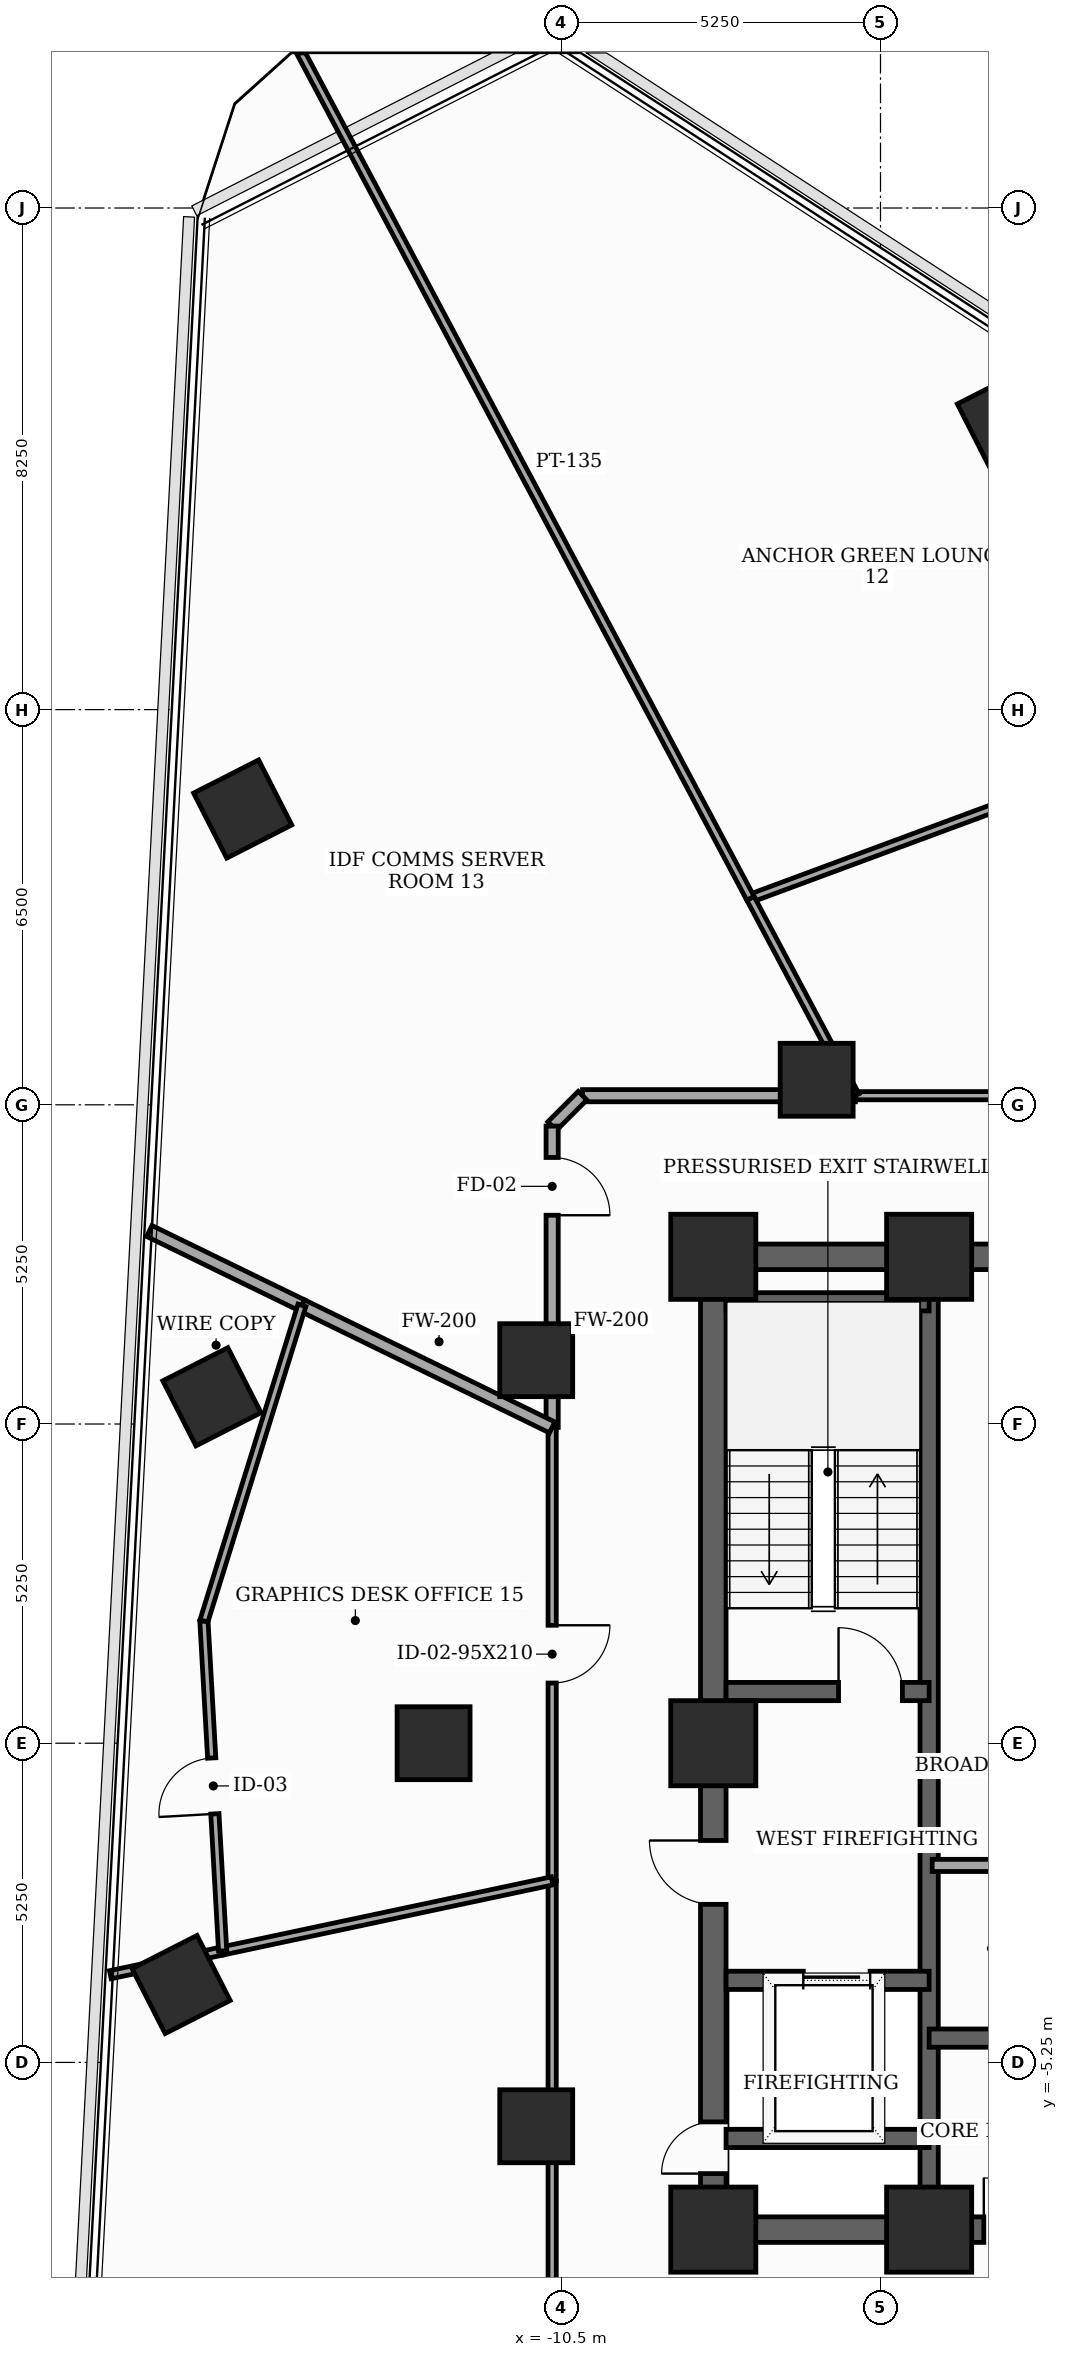
"""IFC4 building model, lengths in metres.
Left out: names, types, materials, properties, quantities, classifications, styles, units other than length and angle.
Written with IfcOpenShell. Run it as: python <this file> out.ifc"""

import sys

from ifc_helpers import new_model, si_unit, direction, frame, frame_2d, origin, origin_2d, place, context, subcontext, project, spatial, rectangle, extrude, element, fill, save


model = new_model("IFC4")
c1 = context("Model", 3, precision=1e-05, world=origin(), true_north=direction((0.0, 1.0)))
c2 = subcontext(c1, "Body", "Model", "MODEL_VIEW")
j1 = project(units=[si_unit("LENGTHUNIT", "METRE"), si_unit("PLANEANGLEUNIT", "RADIAN")], contexts=[c1])
p1 = place(None, origin())
s1 = spatial("IfcSite", under=j1, at=p1, CompositionType="ELEMENT")
p2 = place(p1, origin())
s2 = spatial("IfcBuilding", under=s1, at=p2, CompositionType="ELEMENT")
p3 = place(p2, frame((0.0, 0.0, 145.8)))
s3 = spatial("IfcBuildingStorey", under=s2, at=p3, CompositionType="ELEMENT", Elevation=145.8)
for number, where, z_axis, x_axis in (
    (1, (-8.0, -8.0, 0.0), (0.0, 0.0, 1.0), (1.0, 0.0, 0.0)),
    (2, (-4.45, -8.0, 0.0), (0.0, 0.0, 1.0), (1.0, 0.0, 0.0)),
    (3, (-4.45, 8.0, 0.0), (0.0, 0.0, 1.0), (1.0, 0.0, 0.0)),
    (4, (-8.0, 8.0, 0.0), (0.0, 0.0, 1.0), (1.0, 0.0, 0.0)),
    (5, (-8.0, 0.0, 0.0), (0.0, 0.0, 1.0), (1.0, 0.0, 0.0)),
):
    element("IfcColumn", number, at=place(p3, frame(where, z_axis=z_axis, x_axis=x_axis)), inside=s3, PredefinedType="COLUMN", context=c2, shape_type="SweptSolid", body=[
        extrude(rectangle(XDim=1.4, YDim=1.4, at=origin_2d()), origin(), (0.0, 0.0, 1.0), 3.7),
    ])
for number, where, z_axis, x_axis in (
    (6, (-6.3, 10.912, 0.0), (0.0, 0.0, 1.0), (1.0, 0.0, 0.0)),
    (7, (-10.912, 6.3, 0.0), (0.0, 0.0, 1.0), (1.0, 0.0, 0.0)),
    (8, (-12.6, 0.0, 0.0), (0.0, 0.0, 1.0), (1.0, 0.0, 0.0)),
    (9, (-10.912, -6.3, 0.0), (0.0, 0.0, 1.0), (1.0, 0.0, 0.0)),
    (10, (-3.179, 21.765, 0.0), (0.0, 0.0, 1.0), (0.891, 0.454, 0.0)),
    (11, (-15.739, 15.365, 0.0), (0.0, 0.0, 1.0), (0.891, 0.454, 0.0)),
    (12, (-16.246, 5.698, 0.0), (0.0, 0.0, 1.0), (0.891, 0.454, 0.0)),
    (13, (-16.752, -3.969, 0.0), (0.0, 0.0, 1.0), (0.891, 0.454, 0.0)),
):
    element("IfcColumn", number, at=place(p3, frame(where, z_axis=z_axis, x_axis=x_axis)), inside=s3, PredefinedType="COLUMN", context=c2, shape_type="SweptSolid", body=[
        extrude(rectangle(XDim=1.2, YDim=1.2, at=origin_2d()), origin(), (0.0, 0.0, 1.0), 3.7),
    ])
p4 = place(p3, frame((-8.0, -8.0, 0.0), z_axis=(0.0, 0.0, 1.0), x_axis=(0.0, 1.0, 0.0)))
e14 = element("IfcWall", 14, at=p4, inside=s3, PredefinedType="SHEAR", context=c2, shape_type="SweptSolid", body=[
    extrude(rectangle(XDim=16.0, YDim=0.42, at=frame_2d((8.0, 0.0))), origin(), (0.0, 0.0, 1.0), 3.46),
])
p5 = place(p4, frame((0.922, 0.0, 0.0)))
e15 = element("IfcOpeningElement", 15, at=p5, cuts=e14, PredefinedType="OPENING", context=c2, shape_type="SweptSolid", body=[
    extrude(rectangle(XDim=0.85, YDim=2.02, at=frame_2d((0.425, 1.01))), frame((0.0, 0.22, 0.0), z_axis=(0.0, -1.0, 0.0), x_axis=(1.0, 0.0, 0.0)), (0.0, 0.0, 1.0), 0.44),
])
p6 = place(p4, frame((5.35, 0.0, 0.0)))
e16 = element("IfcOpeningElement", 16, at=p6, cuts=e14, PredefinedType="OPENING", context=c2, shape_type="SweptSolid", body=[
    extrude(rectangle(XDim=1.05, YDim=2.15, at=frame_2d((0.525, 1.075))), frame((0.0, 0.22, 0.0), z_axis=(0.0, -1.0, 0.0), x_axis=(1.0, 0.0, 0.0)), (0.0, 0.0, 1.0), 0.44),
])
p7 = place(p3, frame((-8.0, -8.0, 0.0), z_axis=(0.0, 0.0, 1.0), x_axis=(1.0, 0.0, 0.0)))
e17 = element("IfcWall", 17, at=p7, inside=s3, PredefinedType="SHEAR", context=c2, shape_type="SweptSolid", body=[
    extrude(rectangle(XDim=16.0, YDim=0.42, at=frame_2d((8.0, 0.0))), origin(), (0.0, 0.0, 1.0), 3.46),
])
p8 = place(p7, frame((4.449, 0.0, 0.0)))
e18 = element("IfcOpeningElement", 18, at=p8, cuts=e17, PredefinedType="OPENING", context=c2, shape_type="SweptSolid", body=[
    extrude(rectangle(XDim=0.85, YDim=2.02, at=frame_2d((0.425, 1.01))), frame((0.0, 0.22, 0.0), z_axis=(0.0, -1.0, 0.0), x_axis=(1.0, 0.0, 0.0)), (0.0, 0.0, 1.0), 0.44),
])
p9 = place(p7, frame((6.49, 0.0, 0.0)))
e19 = element("IfcOpeningElement", 19, at=p9, cuts=e17, PredefinedType="OPENING", context=c2, shape_type="SweptSolid", body=[
    extrude(rectangle(XDim=0.85, YDim=2.02, at=frame_2d((0.425, 1.01))), frame((0.0, 0.22, 0.0), z_axis=(0.0, -1.0, 0.0), x_axis=(1.0, 0.0, 0.0)), (0.0, 0.0, 1.0), 0.44),
])
p10 = place(p7, frame((8.69, 0.0, 0.0)))
e20 = element("IfcOpeningElement", 20, at=p10, cuts=e17, PredefinedType="OPENING", context=c2, shape_type="SweptSolid", body=[
    extrude(rectangle(XDim=0.85, YDim=2.02, at=frame_2d((0.425, 1.01))), frame((0.0, 0.22, 0.0), z_axis=(0.0, -1.0, 0.0), x_axis=(1.0, 0.0, 0.0)), (0.0, 0.0, 1.0), 0.44),
])
p11 = place(p7, frame((10.701, 0.0, 0.0)))
e21 = element("IfcOpeningElement", 21, at=p11, cuts=e17, PredefinedType="OPENING", context=c2, shape_type="SweptSolid", body=[
    extrude(rectangle(XDim=0.85, YDim=2.02, at=frame_2d((0.425, 1.01))), frame((0.0, 0.22, 0.0), z_axis=(0.0, -1.0, 0.0), x_axis=(1.0, 0.0, 0.0)), (0.0, 0.0, 1.0), 0.44),
])
p12 = place(p3, frame((-8.0, 8.0, 0.0), z_axis=(0.0, 0.0, 1.0), x_axis=(1.0, 0.0, 0.0)))
e22 = element("IfcWall", 22, at=p12, inside=s3, PredefinedType="SHEAR", context=c2, shape_type="SweptSolid", body=[
    extrude(rectangle(XDim=16.0, YDim=0.42, at=frame_2d((8.0, 0.0))), origin(), (0.0, 0.0, 1.0), 3.46),
])
p13 = place(p12, frame((7.1, 0.0, 0.0)))
e23 = element("IfcOpeningElement", 23, at=p13, cuts=e22, PredefinedType="OPENING", context=c2, shape_type="SweptSolid", body=[
    extrude(rectangle(XDim=1.8, YDim=2.15, at=frame_2d((0.9, 1.075))), frame((0.0, 0.22, 0.0), z_axis=(0.0, -1.0, 0.0), x_axis=(1.0, 0.0, 0.0)), (0.0, 0.0, 1.0), 0.44),
])
p14 = place(p3, frame((-4.45, -7.79, 0.0), z_axis=(0.0, 0.0, 1.0), x_axis=(0.0, 1.0, 0.0)))
e24 = element("IfcWall", 24, at=p14, inside=s3, PredefinedType="SHEAR", context=c2, shape_type="SweptSolid", body=[
    extrude(rectangle(XDim=15.58, YDim=0.3, at=frame_2d((7.79, 0.0))), origin(), (0.0, 0.0, 1.0), 3.46),
])
p15 = place(p3, frame((-7.79, 0.85, 0.0), z_axis=(0.0, 0.0, 1.0), x_axis=(1.0, 0.0, 0.0)))
e25 = element("IfcWall", 25, at=p15, inside=s3, PredefinedType="SHEAR", context=c2, shape_type="SweptSolid", body=[
    extrude(rectangle(XDim=3.34, YDim=0.3, at=frame_2d((1.67, 0.0))), origin(), (0.0, 0.0, 1.0), 3.46),
])
p16 = place(p15, frame((1.85, 0.0, 0.0)))
e26 = element("IfcOpeningElement", 26, at=p16, cuts=e25, PredefinedType="OPENING", context=c2, shape_type="SweptSolid", body=[
    extrude(rectangle(XDim=1.05, YDim=2.15, at=frame_2d((0.525, 1.075))), frame((0.0, 0.16, 0.0), z_axis=(0.0, -1.0, 0.0), x_axis=(1.0, 0.0, 0.0)), (0.0, 0.0, 1.0), 0.32),
])
p17 = place(p3, frame((-7.79, 7.26, 0.0), z_axis=(0.0, 0.0, 1.0), x_axis=(1.0, 0.0, 0.0)))
e27 = element("IfcWall", 27, at=p17, inside=s3, PredefinedType="SHEAR", context=c2, shape_type="SweptSolid", body=[
    extrude(rectangle(XDim=3.34, YDim=0.3, at=frame_2d((1.67, 0.0))), origin(), (0.0, 0.0, 1.0), 3.46),
])
p18 = place(p3, frame((-7.79, -3.9, 0.0), z_axis=(0.0, 0.0, 1.0), x_axis=(1.0, 0.0, 0.0)))
e28 = element("IfcWall", 28, at=p18, inside=s3, PredefinedType="SHEAR", context=c2, shape_type="SweptSolid", body=[
    extrude(rectangle(XDim=3.34, YDim=0.3, at=frame_2d((1.67, 0.0))), origin(), (0.0, 0.0, 1.0), 3.46),
])
p19 = place(p18, frame((1.27, 0.0, 0.0)))
e29 = element("IfcOpeningElement", 29, at=p19, cuts=e28, PredefinedType="OPENING", context=c2, shape_type="SweptSolid", body=[
    extrude(rectangle(XDim=1.1, YDim=2.1, at=frame_2d((0.55, 1.05))), frame((0.0, 0.16, 0.0), z_axis=(0.0, -1.0, 0.0), x_axis=(1.0, 0.0, 0.0)), (0.0, 0.0, 1.0), 0.32),
])
p20 = place(p3, frame((-7.79, -6.5, 0.0), z_axis=(0.0, 0.0, 1.0), x_axis=(1.0, 0.0, 0.0)))
e30 = element("IfcWall", 30, at=p20, inside=s3, PredefinedType="SHEAR", context=c2, shape_type="SweptSolid", body=[
    extrude(rectangle(XDim=3.34, YDim=0.3, at=frame_2d((1.67, 0.0))), origin(), (0.0, 0.0, 1.0), 3.46),
])
p21 = place(p3, frame((-4.45, -4.85, 0.0), z_axis=(0.0, 0.0, 1.0), x_axis=(1.0, 0.0, 0.0)))
e31 = element("IfcWall", 31, at=p21, inside=s3, PredefinedType="SHEAR", context=c2, shape_type="SweptSolid", body=[
    extrude(rectangle(XDim=8.9, YDim=0.3, at=frame_2d((4.45, 0.0))), origin(), (0.0, 0.0, 1.0), 3.46),
])
p22 = place(p3, frame((-4.4, -2.01, 0.0), z_axis=(0.0, 0.0, 1.0), x_axis=(1.0, 0.0, 0.0)))
e32 = element("IfcWall", 32, at=p22, inside=s3, PredefinedType="SOLIDWALL", context=c2, shape_type="SweptSolid", body=[
    extrude(rectangle(XDim=2.68, YDim=0.2, at=frame_2d((1.34, 0.0))), origin(), (0.0, 0.0, 1.0), 3.46),
])
p23 = place(p3, frame((-10.65, -2.264, 0.0), z_axis=(0.0, 0.0, 1.0), x_axis=(0.0, -1.0, 0.0)))
e33 = element("IfcWall", 33, at=p23, inside=s3, PredefinedType="PARTITIONING", context=c2, shape_type="SweptSolid", body=[
    extrude(rectangle(XDim=7.886, YDim=0.135, at=frame_2d((3.943, 0.0))), origin(), (0.0, 0.0, 1.0), 2.045),
])
p24 = place(p3, frame((4.742, 10.65, 0.0), z_axis=(0.0, 0.0, 1.0), x_axis=(-1.0, 0.0, 0.0)))
e34 = element("IfcWall", 34, at=p24, inside=s3, PredefinedType="PARTITIONING", context=c2, shape_type="SweptSolid", body=[
    extrude(rectangle(XDim=10.405, YDim=0.135, at=frame_2d((5.203, 0.0))), origin(), (0.0, 0.0, 1.0), 2.745),
])
p25 = place(p24, frame((5.976, 0.0, 0.0)))
e35 = element("IfcOpeningElement", 35, at=p25, cuts=e34, PredefinedType="OPENING", context=c2, shape_type="SweptSolid", body=[
    extrude(rectangle(XDim=0.95, YDim=2.1, at=frame_2d((0.475, 1.05))), frame((0.0, 0.077, 0.0), z_axis=(0.0, -1.0, 0.0), x_axis=(1.0, 0.0, 0.0)), (0.0, 0.0, 1.0), 0.155),
])
p26 = place(p3, frame((-5.663, 10.65, 0.0), z_axis=(0.0, 0.0, 1.0), x_axis=(-1.0, 0.0, 0.0)))
e36 = element("IfcWall", 36, at=p26, inside=s3, PredefinedType="SOLIDWALL", context=c2, shape_type="SweptSolid", body=[
    extrude(rectangle(XDim=4.487, YDim=0.2, at=frame_2d((2.243, 0.0))), origin(), (0.0, 0.0, 1.0), 2.745),
])
p27 = place(p3, frame((-10.15, 10.65, 0.0), z_axis=(0.0, 0.0, 1.0), x_axis=(-0.707106781187, -0.707106781187, 0.0)))
e37 = element("IfcWall", 37, at=p27, inside=s3, PredefinedType="SOLIDWALL", context=c2, shape_type="SweptSolid", body=[
    extrude(rectangle(XDim=0.707, YDim=0.2, at=frame_2d((0.354, 0.0))), origin(), (0.0, 0.0, 1.0), 3.46),
])
p28 = place(p3, frame((-10.65, 10.15, 0.0), z_axis=(0.0, 0.0, 1.0), x_axis=(0.0, -1.0, 0.0)))
e38 = element("IfcWall", 38, at=p28, inside=s3, PredefinedType="SOLIDWALL", context=c2, shape_type="SweptSolid", body=[
    extrude(rectangle(XDim=4.956, YDim=0.2, at=frame_2d((2.478, 0.0))), origin(), (0.0, 0.0, 1.0), 2.045),
])
p29 = place(p28, frame((0.516, 0.0, 0.0)))
e39 = element("IfcOpeningElement", 39, at=p29, cuts=e38, PredefinedType="OPENING", context=c2, shape_type="SweptSolid", body=[
    extrude(rectangle(XDim=0.95, YDim=2.0, at=frame_2d((0.475, 1.0))), frame((0.0, 0.11, 0.0), z_axis=(0.0, -1.0, 0.0), x_axis=(1.0, 0.0, 0.0)), (0.0, 0.0, 1.0), 0.22),
])
p30 = place(p3, frame((-10.65, 5.194, 0.0), z_axis=(0.0, 0.0, 1.0), x_axis=(0.0, -1.0, 0.0)))
e40 = element("IfcWall", 40, at=p30, inside=s3, PredefinedType="PARTITIONING", context=c2, shape_type="SweptSolid", body=[
    extrude(rectangle(XDim=7.458, YDim=0.135, at=frame_2d((3.729, 0.0))), origin(), (0.0, 0.0, 1.0), 2.745),
])
p31 = place(p30, frame((3.254, 0.0, 0.0)))
e41 = element("IfcOpeningElement", 41, at=p31, cuts=e40, PredefinedType="OPENING", context=c2, shape_type="SweptSolid", body=[
    extrude(rectangle(XDim=0.95, YDim=2.1, at=frame_2d((0.475, 1.05))), frame((0.0, 0.077, 0.0), z_axis=(0.0, -1.0, 0.0), x_axis=(1.0, 0.0, 0.0)), (0.0, 0.0, 1.0), 0.155),
])
p32 = place(p3, frame((-16.069, -3.416, 0.0), z_axis=(0.0, 0.0, 1.0), x_axis=(-0.978246851629, -0.207444202805, 0.0)))
e42 = element("IfcWall", 42, at=p32, inside=s3, PredefinedType="PARTITIONING", context=c2, shape_type="SweptSolid", body=[
    extrude(rectangle(XDim=1.888, YDim=0.135, at=frame_2d((0.944, 0.0))), origin(), (0.0, 0.0, 1.0), 2.045),
])
p33 = place(p3, frame((-10.65, -2.264, 0.0), z_axis=(0.0, 0.0, 1.0), x_axis=(-0.978139695811, -0.207948877079, 0.0)))
e43 = element("IfcWall", 43, at=p33, inside=s3, PredefinedType="PARTITIONING", context=c2, shape_type="SweptSolid", body=[
    extrude(rectangle(XDim=5.54, YDim=0.135, at=frame_2d((2.77, 0.0))), origin(), (0.0, 0.0, 1.0), 2.045),
])
p34 = place(p3, frame((-3.06, 15.501, 0.0), z_axis=(0.0, 0.0, 1.0), x_axis=(-0.937697715957, -0.347452145611, 0.0)))
e44 = element("IfcWall", 44, at=p34, inside=s3, PredefinedType="PARTITIONING", context=c2, shape_type="SweptSolid", body=[
    extrude(rectangle(XDim=4.616, YDim=0.135, at=frame_2d((2.308, 0.0))), origin(), (0.0, 0.0, 1.0), 2.045),
])
p35 = place(p3, frame((-7.389, 13.897, 0.0), z_axis=(0.0, 0.0, 1.0), x_axis=(0.469329971657, -0.883022863636, 0.0)))
e45 = element("IfcWall", 45, at=p35, inside=s3, PredefinedType="PARTITIONING", context=c2, shape_type="SweptSolid", body=[
    extrude(rectangle(XDim=3.677, YDim=0.135, at=frame_2d((1.839, 0.0))), origin(), (0.0, 0.0, 1.0), 2.045),
])
p36 = place(p3, frame((-14.797, 27.829, 0.0), z_axis=(0.0, 0.0, 1.0), x_axis=(0.469495702595, -0.882934757072, 0.0)))
e46 = element("IfcWall", 46, at=p36, inside=s3, PredefinedType="PARTITIONING", context=c2, shape_type="SweptSolid", body=[
    extrude(rectangle(XDim=15.779, YDim=0.135, at=frame_2d((7.89, 0.0))), origin(), (0.0, 0.0, 1.0), 2.045),
])
p37 = place(p3, frame((-17.275, 8.425, 0.0), z_axis=(0.0, 0.0, 1.0), x_axis=(0.898962499014, -0.438025598985, 0.0)))
e47 = element("IfcWall", 47, at=p37, inside=s3, PredefinedType="SOLIDWALL", context=c2, shape_type="SweptSolid", body=[
    extrude(rectangle(XDim=2.792, YDim=0.2, at=frame_2d((1.396, 0.0))), origin(), (0.0, 0.0, 1.0), 2.045),
])
p38 = place(p3, frame((-14.765, 7.202, 0.0), z_axis=(0.0, 0.0, 1.0), x_axis=(0.898725395048, -0.438511874748, 0.0)))
e48 = element("IfcWall", 48, at=p38, inside=s3, PredefinedType="SOLIDWALL", context=c2, shape_type="SweptSolid", body=[
    extrude(rectangle(XDim=4.579, YDim=0.2, at=frame_2d((2.289, 0.0))), origin(), (0.0, 0.0, 1.0), 2.045),
])
p39 = place(p3, frame((-16.069, -3.416, 0.0), z_axis=(0.0, 0.0, 1.0), x_axis=(-0.056636641993, 0.99839485715, 0.0)))
e49 = element("IfcWall", 49, at=p39, inside=s3, PredefinedType="PARTITIONING", context=c2, shape_type="SweptSolid", body=[
    extrude(rectangle(XDim=5.436, YDim=0.135, at=frame_2d((2.718, 0.0))), origin(), (0.0, 0.0, 1.0), 2.045),
])
p40 = place(p39, frame((2.258, 0.0, 0.0)))
e50 = element("IfcOpeningElement", 50, at=p40, cuts=e49, PredefinedType="OPENING", context=c2, shape_type="SweptSolid", body=[
    extrude(rectangle(XDim=0.92, YDim=2.0, at=frame_2d((0.46, 1.0))), frame((0.0, 0.077, 0.0), z_axis=(0.0, -1.0, 0.0), x_axis=(1.0, 0.0, 0.0)), (0.0, 0.0, 1.0), 0.155),
])
p41 = place(p3, frame((-16.377, 2.011, 0.0), z_axis=(0.0, 0.0, 1.0), x_axis=(0.296581456096, 0.955007560127, 0.0)))
e51 = element("IfcWall", 51, at=p41, inside=s3, PredefinedType="PARTITIONING", context=c2, shape_type="SweptSolid", body=[
    extrude(rectangle(XDim=5.436, YDim=0.135, at=frame_2d((2.718, 0.0))), origin(), (0.0, 0.0, 1.0), 2.045),
])
p42 = place(p5, origin())
e52 = element("IfcDoor", 52, at=p42, inside=s3, OperationType="SINGLE_SWING_LEFT", PredefinedType="TRAPDOOR", context=c2, shape_type="SweptSolid", body=[
    extrude(rectangle(XDim=0.85, YDim=2.02, at=frame_2d((0.425, 1.01))), frame((0.0, 0.025, 0.0), z_axis=(0.0, -1.0, 0.0), x_axis=(1.0, 0.0, 0.0)), (0.0, 0.0, 1.0), 0.05),
])
fill(e15, e52)
p43 = place(p6, origin())
e53 = element("IfcDoor", 53, at=p43, inside=s3, OperationType="SINGLE_SWING_RIGHT", PredefinedType="DOOR", context=c2, shape_type="SweptSolid", body=[
    extrude(rectangle(XDim=1.05, YDim=2.15, at=frame_2d((0.525, 1.075))), frame((0.0, 0.025, 0.0), z_axis=(0.0, -1.0, 0.0), x_axis=(1.0, 0.0, 0.0)), (0.0, 0.0, 1.0), 0.05),
])
fill(e16, e53)
p44 = place(p8, origin())
e54 = element("IfcDoor", 54, at=p44, inside=s3, OperationType="SINGLE_SWING_LEFT", PredefinedType="TRAPDOOR", context=c2, shape_type="SweptSolid", body=[
    extrude(rectangle(XDim=0.85, YDim=2.02, at=frame_2d((0.425, 1.01))), frame((0.0, 0.025, 0.0), z_axis=(0.0, -1.0, 0.0), x_axis=(1.0, 0.0, 0.0)), (0.0, 0.0, 1.0), 0.05),
])
fill(e18, e54)
p45 = place(p16, origin())
e55 = element("IfcDoor", 55, at=p45, inside=s3, OperationType="SINGLE_SWING_LEFT", PredefinedType="DOOR", context=c2, shape_type="SweptSolid", body=[
    extrude(rectangle(XDim=1.05, YDim=2.15, at=frame_2d((0.525, 1.075))), frame((0.0, 0.025, 0.0), z_axis=(0.0, -1.0, 0.0), x_axis=(1.0, 0.0, 0.0)), (0.0, 0.0, 1.0), 0.05),
])
fill(e26, e55)
p46 = place(p19, origin())
e56 = element("IfcDoor", 56, at=p46, inside=s3, OperationType="SLIDING_TO_LEFT", PredefinedType="DOOR", context=c2, shape_type="SweptSolid", body=[
    extrude(rectangle(XDim=1.1, YDim=2.1, at=frame_2d((0.55, 1.05))), frame((0.0, 0.025, 0.0), z_axis=(0.0, -1.0, 0.0), x_axis=(1.0, 0.0, 0.0)), (0.0, 0.0, 1.0), 0.05),
])
fill(e29, e56)
p47 = place(p29, origin())
e57 = element("IfcDoor", 57, at=p47, inside=s3, OperationType="SINGLE_SWING_RIGHT", PredefinedType="DOOR", context=c2, shape_type="SweptSolid", body=[
    extrude(rectangle(XDim=0.95, YDim=2.0, at=frame_2d((0.475, 1.0))), frame((0.0, 0.025, 0.0), z_axis=(0.0, -1.0, 0.0), x_axis=(1.0, 0.0, 0.0)), (0.0, 0.0, 1.0), 0.05),
])
fill(e39, e57)
p48 = place(p31, origin())
e58 = element("IfcDoor", 58, at=p48, inside=s3, OperationType="SINGLE_SWING_LEFT", PredefinedType="DOOR", context=c2, shape_type="SweptSolid", body=[
    extrude(rectangle(XDim=0.95, YDim=2.1, at=frame_2d((0.475, 1.05))), frame((0.0, 0.025, 0.0), z_axis=(0.0, -1.0, 0.0), x_axis=(1.0, 0.0, 0.0)), (0.0, 0.0, 1.0), 0.05),
])
fill(e41, e58)
p49 = place(p40, origin())
e59 = element("IfcDoor", 59, at=p49, inside=s3, OperationType="SINGLE_SWING_LEFT", PredefinedType="DOOR", context=c2, shape_type="SweptSolid", body=[
    extrude(rectangle(XDim=0.92, YDim=2.0, at=frame_2d((0.46, 1.0))), frame((0.0, 0.025, 0.0), z_axis=(0.0, -1.0, 0.0), x_axis=(1.0, 0.0, 0.0)), (0.0, 0.0, 1.0), 0.05),
])
fill(e50, e59)
save(model, sys.argv[1])
